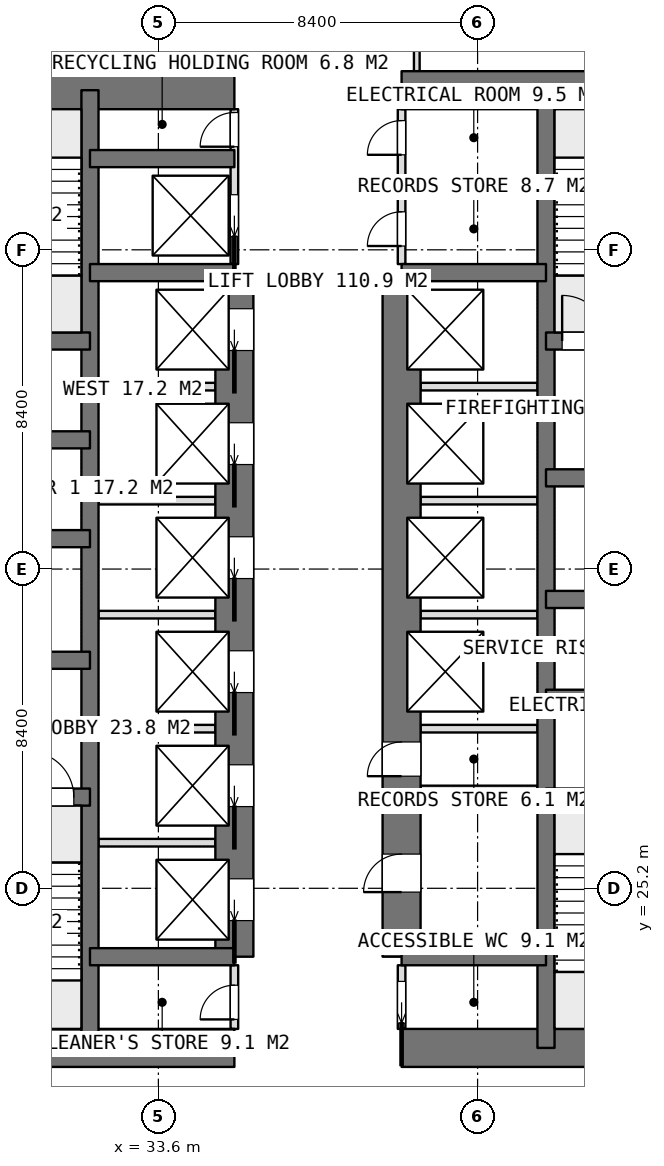
"""IFC4 building model, lengths in metres.
Left out: names, types, materials, properties, quantities, classifications, styles, units other than length and angle.
Written with IfcOpenShell. Run it as: python <this file> out.ifc"""

import sys

from ifc_helpers import new_model, si_unit, direction, frame, frame_2d, origin, place, context, subcontext, project, spatial, rectangle, extrude, element, fill, save


model = new_model("IFC4")
c1 = context("Model", 3, precision=1e-05, world=origin(), true_north=direction((0.0, 1.0)))
c2 = subcontext(c1, "Body", "Model", "MODEL_VIEW")
j1 = project(units=[si_unit("LENGTHUNIT", "METRE"), si_unit("PLANEANGLEUNIT", "RADIAN")], contexts=[c1])
p1 = place(None, origin())
s1 = spatial("IfcSite", under=j1, at=p1, CompositionType="ELEMENT")
p2 = place(p1, origin())
s2 = spatial("IfcBuilding", under=s1, at=p2, CompositionType="ELEMENT")
p3 = place(p2, frame((0.0, 0.0, 99.05)))
s3 = spatial("IfcBuildingStorey", under=s2, at=p3, CompositionType="ELEMENT", Elevation=99.05)
p4 = place(p3, frame((25.2, 21.0, 0.0), z_axis=(0.0, 0.0, 1.0), x_axis=(1.0, 0.0, 0.0)))
e1 = element("IfcWall", 1, at=p4, inside=s3, PredefinedType="SHEAR", context=c2, shape_type="SweptSolid", body=[
    extrude(rectangle(XDim=10.4, YDim=1.0, at=frame_2d((5.2, 0.0))), origin(), (0.0, 0.0, 1.0), 3.75),
])
p5 = place(p3, frame((40.0, 21.0, 0.0), z_axis=(0.0, 0.0, 1.0), x_axis=(1.0, 0.0, 0.0)))
e2 = element("IfcWall", 2, at=p5, inside=s3, PredefinedType="SHEAR", context=c2, shape_type="SweptSolid", body=[
    extrude(rectangle(XDim=10.4, YDim=1.0, at=frame_2d((5.2, 0.0))), origin(), (0.0, 0.0, 1.0), 3.75),
])
p6 = place(p3, frame((25.2, 46.2, 0.0), z_axis=(0.0, 0.0, 1.0), x_axis=(1.0, 0.0, 0.0)))
e3 = element("IfcWall", 3, at=p6, inside=s3, PredefinedType="SHEAR", context=c2, shape_type="SweptSolid", body=[
    extrude(rectangle(XDim=10.4, YDim=1.0, at=frame_2d((5.2, 0.0))), origin(), (0.0, 0.0, 1.0), 3.75),
])
p7 = place(p3, frame((40.0, 46.2, 0.0), z_axis=(0.0, 0.0, 1.0), x_axis=(1.0, 0.0, 0.0)))
e4 = element("IfcWall", 4, at=p7, inside=s3, PredefinedType="SHEAR", context=c2, shape_type="SweptSolid", body=[
    extrude(rectangle(XDim=10.4, YDim=1.0, at=frame_2d((5.2, 0.0))), origin(), (0.0, 0.0, 1.0), 3.75),
])
for number, where, z_axis, x_axis in (
    (5, (31.8, 21.0, 0.0), (0.0, 0.0, 1.0), (0.0, 1.0, 0.0)),
    (6, (43.8, 21.0, 0.0), (0.0, 0.0, 1.0), (0.0, 1.0, 0.0)),
):
    element("IfcWall", number, at=place(p3, frame(where, z_axis=z_axis, x_axis=x_axis)), inside=s3, PredefinedType="SHEAR", context=c2, shape_type="SweptSolid", body=[
        extrude(rectangle(XDim=25.2, YDim=0.45, at=frame_2d((12.6, 0.0))), origin(), (0.0, 0.0, 1.0), 3.75),
    ])
p8 = place(p3, frame((35.6, 23.4, 0.0), z_axis=(0.0, 0.0, 1.0), x_axis=(0.0, 1.0, 0.0)))
e7 = element("IfcWall", 7, at=p8, inside=s3, PredefinedType="SHEAR", context=c2, shape_type="SweptSolid", body=[
    extrude(rectangle(XDim=18.0, YDim=1.0, at=frame_2d((9.0, 0.0))), origin(), (0.0, 0.0, 1.0), 3.75),
])
p9 = place(p8, frame((0.95, 0.0, 0.0)))
e8 = element("IfcOpeningElement", 8, at=p9, cuts=e7, PredefinedType="OPENING", context=c2, shape_type="SweptSolid", body=[
    extrude(rectangle(XDim=1.1, YDim=2.1, at=frame_2d((0.55, 1.05))), frame((0.0, 0.51, 0.0), z_axis=(0.0, -1.0, 0.0), x_axis=(1.0, 0.0, 0.0)), (0.0, 0.0, 1.0), 1.02),
])
p10 = place(p8, frame((3.95, 0.0, 0.0)))
e9 = element("IfcOpeningElement", 9, at=p10, cuts=e7, PredefinedType="OPENING", context=c2, shape_type="SweptSolid", body=[
    extrude(rectangle(XDim=1.1, YDim=2.1, at=frame_2d((0.55, 1.05))), frame((0.0, 0.51, 0.0), z_axis=(0.0, -1.0, 0.0), x_axis=(1.0, 0.0, 0.0)), (0.0, 0.0, 1.0), 1.02),
])
p11 = place(p8, frame((6.95, 0.0, 0.0)))
e10 = element("IfcOpeningElement", 10, at=p11, cuts=e7, PredefinedType="OPENING", context=c2, shape_type="SweptSolid", body=[
    extrude(rectangle(XDim=1.1, YDim=2.1, at=frame_2d((0.55, 1.05))), frame((0.0, 0.51, 0.0), z_axis=(0.0, -1.0, 0.0), x_axis=(1.0, 0.0, 0.0)), (0.0, 0.0, 1.0), 1.02),
])
p12 = place(p8, frame((9.95, 0.0, 0.0)))
e11 = element("IfcOpeningElement", 11, at=p12, cuts=e7, PredefinedType="OPENING", context=c2, shape_type="SweptSolid", body=[
    extrude(rectangle(XDim=1.1, YDim=2.1, at=frame_2d((0.55, 1.05))), frame((0.0, 0.51, 0.0), z_axis=(0.0, -1.0, 0.0), x_axis=(1.0, 0.0, 0.0)), (0.0, 0.0, 1.0), 1.02),
])
p13 = place(p8, frame((12.95, 0.0, 0.0)))
e12 = element("IfcOpeningElement", 12, at=p13, cuts=e7, PredefinedType="OPENING", context=c2, shape_type="SweptSolid", body=[
    extrude(rectangle(XDim=1.1, YDim=2.1, at=frame_2d((0.55, 1.05))), frame((0.0, 0.51, 0.0), z_axis=(0.0, -1.0, 0.0), x_axis=(1.0, 0.0, 0.0)), (0.0, 0.0, 1.0), 1.02),
])
p14 = place(p8, frame((15.95, 0.0, 0.0)))
e13 = element("IfcOpeningElement", 13, at=p14, cuts=e7, PredefinedType="OPENING", context=c2, shape_type="SweptSolid", body=[
    extrude(rectangle(XDim=1.1, YDim=2.1, at=frame_2d((0.55, 1.05))), frame((0.0, 0.51, 0.0), z_axis=(0.0, -1.0, 0.0), x_axis=(1.0, 0.0, 0.0)), (0.0, 0.0, 1.0), 1.02),
])
p15 = place(p3, frame((40.0, 23.4, 0.0), z_axis=(0.0, 0.0, 1.0), x_axis=(0.0, 1.0, 0.0)))
e14 = element("IfcWall", 14, at=p15, inside=s3, PredefinedType="SHEAR", context=c2, shape_type="SweptSolid", body=[
    extrude(rectangle(XDim=18.0, YDim=1.0, at=frame_2d((9.0, 0.0))), origin(), (0.0, 0.0, 1.0), 3.75),
])
p16 = place(p15, frame((1.7, 0.0, 0.0)))
e15 = element("IfcOpeningElement", 15, at=p16, cuts=e14, PredefinedType="OPENING", context=c2, shape_type="SweptSolid", body=[
    extrude(rectangle(XDim=1.0, YDim=2.1, at=frame_2d((0.5, 1.05))), frame((0.0, 0.51, 0.0), z_axis=(0.0, -1.0, 0.0), x_axis=(1.0, 0.0, 0.0)), (0.0, 0.0, 1.0), 1.02),
])
p17 = place(p15, frame((4.75, 0.0, 0.0)))
e16 = element("IfcOpeningElement", 16, at=p17, cuts=e14, PredefinedType="OPENING", context=c2, shape_type="SweptSolid", body=[
    extrude(rectangle(XDim=0.9, YDim=2.1, at=frame_2d((0.45, 1.05))), frame((0.0, 0.51, 0.0), z_axis=(0.0, -1.0, 0.0), x_axis=(1.0, 0.0, 0.0)), (0.0, 0.0, 1.0), 1.02),
])
for number, where, z_axis, x_axis in (
    (17, (31.8, 23.4, 0.0), (0.0, 0.0, 1.0), (1.0, 0.0, 0.0)),
    (18, (31.8, 41.4, 0.0), (0.0, 0.0, 1.0), (1.0, 0.0, 0.0)),
    (19, (31.8, 44.4, 0.0), (0.0, 0.0, 1.0), (1.0, 0.0, 0.0)),
    (20, (40.0, 23.4, 0.0), (0.0, 0.0, 1.0), (1.0, 0.0, 0.0)),
    (21, (40.0, 41.4, 0.0), (0.0, 0.0, 1.0), (1.0, 0.0, 0.0)),
):
    element("IfcWall", number, at=place(p3, frame(where, z_axis=z_axis, x_axis=x_axis)), inside=s3, PredefinedType="SHEAR", context=c2, shape_type="SweptSolid", body=[
        extrude(rectangle(XDim=3.8, YDim=0.45, at=frame_2d((1.9, 0.0))), origin(), (0.0, 0.0, 1.0), 3.75),
    ])
p18 = place(p3, frame((25.2, 27.6, 0.0), z_axis=(0.0, 0.0, 1.0), x_axis=(1.0, 0.0, 0.0)))
e22 = element("IfcWall", 22, at=p18, inside=s3, PredefinedType="SHEAR", context=c2, shape_type="SweptSolid", body=[
    extrude(rectangle(XDim=6.6, YDim=0.45, at=frame_2d((3.3, 0.0))), origin(), (0.0, 0.0, 1.0), 3.75),
])
p19 = place(p18, frame((4.975, 0.0, 0.0)))
e23 = element("IfcOpeningElement", 23, at=p19, cuts=e22, PredefinedType="OPENING", context=c2, shape_type="SweptSolid", body=[
    extrude(rectangle(XDim=1.2, YDim=2.1, at=frame_2d((0.6, 1.05))), frame((0.0, 0.235, 0.0), z_axis=(0.0, -1.0, 0.0), x_axis=(1.0, 0.0, 0.0)), (0.0, 0.0, 1.0), 0.47),
])
p20 = place(p3, frame((25.2, 31.2, 0.0), z_axis=(0.0, 0.0, 1.0), x_axis=(1.0, 0.0, 0.0)))
e24 = element("IfcWall", 24, at=p20, inside=s3, PredefinedType="SHEAR", context=c2, shape_type="SweptSolid", body=[
    extrude(rectangle(XDim=6.6, YDim=0.45, at=frame_2d((3.3, 0.0))), origin(), (0.0, 0.0, 1.0), 3.75),
])
p21 = place(p20, frame((2.65, 0.0, 0.0)))
e25 = element("IfcOpeningElement", 25, at=p21, cuts=e24, PredefinedType="OPENING", context=c2, shape_type="SweptSolid", body=[
    extrude(rectangle(XDim=1.3, YDim=2.1, at=frame_2d((0.65, 1.05))), frame((0.0, 0.235, 0.0), z_axis=(0.0, -1.0, 0.0), x_axis=(1.0, 0.0, 0.0)), (0.0, 0.0, 1.0), 0.47),
])
for number, where, z_axis, x_axis in (
    (26, (25.2, 34.4, 0.0), (0.0, 0.0, 1.0), (1.0, 0.0, 0.0)),
    (27, (25.2, 37.0, 0.0), (0.0, 0.0, 1.0), (1.0, 0.0, 0.0)),
    (28, (25.2, 39.6, 0.0), (0.0, 0.0, 1.0), (1.0, 0.0, 0.0)),
):
    element("IfcWall", number, at=place(p3, frame(where, z_axis=z_axis, x_axis=x_axis)), inside=s3, PredefinedType="SHEAR", context=c2, shape_type="SweptSolid", body=[
        extrude(rectangle(XDim=6.6, YDim=0.45, at=frame_2d((3.3, 0.0))), origin(), (0.0, 0.0, 1.0), 3.75),
    ])
for number, where, z_axis, x_axis in (
    (29, (43.8, 27.6, 0.0), (0.0, 0.0, 1.0), (1.0, 0.0, 0.0)),
    (30, (43.8, 30.2, 0.0), (0.0, 0.0, 1.0), (1.0, 0.0, 0.0)),
    (31, (43.8, 32.8, 0.0), (0.0, 0.0, 1.0), (1.0, 0.0, 0.0)),
):
    element("IfcWall", number, at=place(p3, frame(where, z_axis=z_axis, x_axis=x_axis)), inside=s3, PredefinedType="SHEAR", context=c2, shape_type="SweptSolid", body=[
        extrude(rectangle(XDim=6.6, YDim=0.45, at=frame_2d((3.3, 0.0))), origin(), (0.0, 0.0, 1.0), 3.75),
    ])
p22 = place(p3, frame((43.8, 36.0, 0.0), z_axis=(0.0, 0.0, 1.0), x_axis=(1.0, 0.0, 0.0)))
e32 = element("IfcWall", 32, at=p22, inside=s3, PredefinedType="SHEAR", context=c2, shape_type="SweptSolid", body=[
    extrude(rectangle(XDim=6.6, YDim=0.45, at=frame_2d((3.3, 0.0))), origin(), (0.0, 0.0, 1.0), 3.75),
])
p23 = place(p22, frame((2.65, 0.0, 0.0)))
e33 = element("IfcOpeningElement", 33, at=p23, cuts=e32, PredefinedType="OPENING", context=c2, shape_type="SweptSolid", body=[
    extrude(rectangle(XDim=1.3, YDim=2.1, at=frame_2d((0.65, 1.05))), frame((0.0, 0.235, 0.0), z_axis=(0.0, -1.0, 0.0), x_axis=(1.0, 0.0, 0.0)), (0.0, 0.0, 1.0), 0.47),
])
p24 = place(p3, frame((43.8, 39.6, 0.0), z_axis=(0.0, 0.0, 1.0), x_axis=(1.0, 0.0, 0.0)))
e34 = element("IfcWall", 34, at=p24, inside=s3, PredefinedType="SHEAR", context=c2, shape_type="SweptSolid", body=[
    extrude(rectangle(XDim=6.6, YDim=0.45, at=frame_2d((3.3, 0.0))), origin(), (0.0, 0.0, 1.0), 3.75),
])
p25 = place(p24, frame((0.425, 0.0, 0.0)))
e35 = element("IfcOpeningElement", 35, at=p25, cuts=e34, PredefinedType="OPENING", context=c2, shape_type="SweptSolid", body=[
    extrude(rectangle(XDim=1.2, YDim=2.1, at=frame_2d((0.6, 1.05))), frame((0.0, 0.235, 0.0), z_axis=(0.0, -1.0, 0.0), x_axis=(1.0, 0.0, 0.0)), (0.0, 0.0, 1.0), 0.47),
])
for number, where, z_axis, x_axis in (
    (36, (32.025, 26.4, 0.0), (0.0, 0.0, 1.0), (1.0, 0.0, 0.0)),
    (37, (32.025, 29.4, 0.0), (0.0, 0.0, 1.0), (1.0, 0.0, 0.0)),
    (38, (32.025, 32.4, 0.0), (0.0, 0.0, 1.0), (1.0, 0.0, 0.0)),
    (39, (32.025, 35.4, 0.0), (0.0, 0.0, 1.0), (1.0, 0.0, 0.0)),
    (40, (32.025, 38.4, 0.0), (0.0, 0.0, 1.0), (1.0, 0.0, 0.0)),
):
    element("IfcWall", number, at=place(p3, frame(where, z_axis=z_axis, x_axis=x_axis)), inside=s3, PredefinedType="PARTITIONING", context=c2, shape_type="SweptSolid", body=[
        extrude(rectangle(XDim=3.075, YDim=0.2, at=frame_2d((1.538, 0.0))), origin(), (0.0, 0.0, 1.0), 3.5),
    ])
for number, where, z_axis, x_axis in (
    (41, (40.5, 29.4, 0.0), (0.0, 0.0, 1.0), (1.0, 0.0, 0.0)),
    (42, (40.5, 32.4, 0.0), (0.0, 0.0, 1.0), (1.0, 0.0, 0.0)),
    (43, (40.5, 35.4, 0.0), (0.0, 0.0, 1.0), (1.0, 0.0, 0.0)),
    (44, (40.5, 38.4, 0.0), (0.0, 0.0, 1.0), (1.0, 0.0, 0.0)),
):
    element("IfcWall", number, at=place(p3, frame(where, z_axis=z_axis, x_axis=x_axis)), inside=s3, PredefinedType="PARTITIONING", context=c2, shape_type="SweptSolid", body=[
        extrude(rectangle(XDim=3.075, YDim=0.2, at=frame_2d((1.538, 0.0))), origin(), (0.0, 0.0, 1.0), 3.5),
    ])
p26 = place(p3, frame((40.0, 21.5, 0.0), z_axis=(0.0, 0.0, 1.0), x_axis=(0.0, 1.0, 0.0)))
e45 = element("IfcWall", 45, at=p26, inside=s3, PredefinedType="PARTITIONING", context=c2, shape_type="SweptSolid", body=[
    extrude(rectangle(XDim=1.675, YDim=0.2, at=frame_2d((0.837, 0.0))), origin(), (0.0, 0.0, 1.0), 3.5),
])
p27 = place(p26, frame((0.15, 0.0, 0.0)))
e46 = element("IfcOpeningElement", 46, at=p27, cuts=e45, PredefinedType="OPENING", context=c2, shape_type="SweptSolid", body=[
    extrude(rectangle(XDim=1.1, YDim=2.1, at=frame_2d((0.55, 1.05))), frame((0.0, 0.11, 0.0), z_axis=(0.0, -1.0, 0.0), x_axis=(1.0, 0.0, 0.0)), (0.0, 0.0, 1.0), 0.22),
])
p28 = place(p3, frame((40.0, 41.625, 0.0), z_axis=(0.0, 0.0, 1.0), x_axis=(0.0, 1.0, 0.0)))
e47 = element("IfcWall", 47, at=p28, inside=s3, PredefinedType="PARTITIONING", context=c2, shape_type="SweptSolid", body=[
    extrude(rectangle(XDim=4.075, YDim=0.2, at=frame_2d((2.038, 0.0))), origin(), (0.0, 0.0, 1.0), 3.5),
])
p29 = place(p28, frame((2.875, 0.0, 0.0)))
e48 = element("IfcOpeningElement", 48, at=p29, cuts=e47, PredefinedType="OPENING", context=c2, shape_type="SweptSolid", body=[
    extrude(rectangle(XDim=0.9, YDim=2.1, at=frame_2d((0.45, 1.05))), frame((0.0, 0.11, 0.0), z_axis=(0.0, -1.0, 0.0), x_axis=(1.0, 0.0, 0.0)), (0.0, 0.0, 1.0), 0.22),
])
p30 = place(p28, frame((0.475, 0.0, 0.0)))
e49 = element("IfcOpeningElement", 49, at=p30, cuts=e47, PredefinedType="OPENING", context=c2, shape_type="SweptSolid", body=[
    extrude(rectangle(XDim=0.9, YDim=2.1, at=frame_2d((0.45, 1.05))), frame((0.0, 0.11, 0.0), z_axis=(0.0, -1.0, 0.0), x_axis=(1.0, 0.0, 0.0)), (0.0, 0.0, 1.0), 0.22),
])
p31 = place(p3, frame((35.6, 41.625, 0.0), z_axis=(0.0, 0.0, 1.0), x_axis=(0.0, 1.0, 0.0)))
e50 = element("IfcWall", 50, at=p31, inside=s3, PredefinedType="PARTITIONING", context=c2, shape_type="SweptSolid", body=[
    extrude(rectangle(XDim=4.075, YDim=0.2, at=frame_2d((2.038, 0.0))), origin(), (0.0, 0.0, 1.0), 3.5),
])
p32 = place(p31, frame((3.088, 0.0, 0.0)))
e51 = element("IfcOpeningElement", 51, at=p32, cuts=e50, PredefinedType="OPENING", context=c2, shape_type="SweptSolid", body=[
    extrude(rectangle(XDim=0.9, YDim=2.1, at=frame_2d((0.45, 1.05))), frame((0.0, 0.11, 0.0), z_axis=(0.0, -1.0, 0.0), x_axis=(1.0, 0.0, 0.0)), (0.0, 0.0, 1.0), 0.22),
])
p33 = place(p31, frame((0.725, 0.0, 0.0)))
e52 = element("IfcOpeningElement", 52, at=p33, cuts=e50, PredefinedType="OPENING", context=c2, shape_type="SweptSolid", body=[
    extrude(rectangle(XDim=1.1, YDim=2.1, at=frame_2d((0.55, 1.05))), frame((0.0, 0.11, 0.0), z_axis=(0.0, -1.0, 0.0), x_axis=(1.0, 0.0, 0.0)), (0.0, 0.0, 1.0), 0.22),
])
p34 = place(p3, frame((35.6, 21.5, 0.0), z_axis=(0.0, 0.0, 1.0), x_axis=(0.0, 1.0, 0.0)))
e53 = element("IfcWall", 53, at=p34, inside=s3, PredefinedType="PARTITIONING", context=c2, shape_type="SweptSolid", body=[
    extrude(rectangle(XDim=1.675, YDim=0.2, at=frame_2d((0.837, 0.0))), origin(), (0.0, 0.0, 1.0), 3.5),
])
p35 = place(p34, frame((0.25, 0.0, 0.0)))
e54 = element("IfcOpeningElement", 54, at=p35, cuts=e53, PredefinedType="OPENING", context=c2, shape_type="SweptSolid", body=[
    extrude(rectangle(XDim=0.9, YDim=2.1, at=frame_2d((0.45, 1.05))), frame((0.0, 0.11, 0.0), z_axis=(0.0, -1.0, 0.0), x_axis=(1.0, 0.0, 0.0)), (0.0, 0.0, 1.0), 0.22),
])
p36 = place(p3, frame((40.5, 27.8, 0.0), z_axis=(0.0, 0.0, 1.0), x_axis=(1.0, 0.0, 0.0)))
e55 = element("IfcWall", 55, at=p36, inside=s3, PredefinedType="PARTITIONING", context=c2, shape_type="SweptSolid", body=[
    extrude(rectangle(XDim=3.075, YDim=0.2, at=frame_2d((1.538, 0.0))), origin(), (0.0, 0.0, 1.0), 3.5),
])
p37 = place(p3, frame((40.0, 43.7, 0.0), z_axis=(0.0, 0.0, 1.0), x_axis=(1.0, 0.0, 0.0)))
e56 = element("IfcWall", 56, at=p37, inside=s3, PredefinedType="PARTITIONING", context=c2, shape_type="SweptSolid", body=[
    extrude(rectangle(XDim=3.575, YDim=0.2, at=frame_2d((1.788, 0.0))), origin(), (0.0, 0.0, 1.0), 3.5),
])
for number, where, z_axis, x_axis in (
    (57, (40.4, 46.7, 0.0), (0.0, 0.0, 1.0), (0.0, 1.0, 0.0)),
    (58, (35.2, 46.7, 0.0), (0.0, 0.0, 1.0), (0.0, 1.0, 0.0)),
):
    element("IfcWall", number, at=place(p3, frame(where, z_axis=z_axis, x_axis=x_axis)), inside=s3, PredefinedType="PARTITIONING", context=c2, shape_type="SweptSolid", body=[
        extrude(rectangle(XDim=2.625, YDim=0.15, at=frame_2d((1.312, 0.0))), origin(), (0.0, 0.0, 1.0), 3.5),
    ])
p38 = place(p27, origin())
e59 = element("IfcDoor", 59, at=p38, inside=s3, OperationType="SLIDING_TO_LEFT", PredefinedType="DOOR", context=c2, shape_type="SweptSolid", body=[
    extrude(rectangle(XDim=1.1, YDim=2.1, at=frame_2d((0.55, 1.05))), frame((0.0, 0.025, 0.0), z_axis=(0.0, -1.0, 0.0), x_axis=(1.0, 0.0, 0.0)), (0.0, 0.0, 1.0), 0.05),
])
fill(e46, e59)
p39 = place(p35, origin())
e60 = element("IfcDoor", 60, at=p39, inside=s3, OperationType="SINGLE_SWING_LEFT", PredefinedType="DOOR", context=c2, shape_type="SweptSolid", body=[
    extrude(rectangle(XDim=0.9, YDim=2.1, at=frame_2d((0.45, 1.05))), frame((0.0, 0.025, 0.0), z_axis=(0.0, -1.0, 0.0), x_axis=(1.0, 0.0, 0.0)), (0.0, 0.0, 1.0), 0.05),
])
fill(e54, e60)
p40 = place(p29, origin())
e61 = element("IfcDoor", 61, at=p40, inside=s3, OperationType="SINGLE_SWING_LEFT", PredefinedType="DOOR", context=c2, shape_type="SweptSolid", body=[
    extrude(rectangle(XDim=0.9, YDim=2.1, at=frame_2d((0.45, 1.05))), frame((0.0, 0.025, 0.0), z_axis=(0.0, -1.0, 0.0), x_axis=(1.0, 0.0, 0.0)), (0.0, 0.0, 1.0), 0.05),
])
fill(e48, e61)
p41 = place(p30, origin())
e62 = element("IfcDoor", 62, at=p41, inside=s3, OperationType="SINGLE_SWING_LEFT", PredefinedType="DOOR", context=c2, shape_type="SweptSolid", body=[
    extrude(rectangle(XDim=0.9, YDim=2.1, at=frame_2d((0.45, 1.05))), frame((0.0, 0.025, 0.0), z_axis=(0.0, -1.0, 0.0), x_axis=(1.0, 0.0, 0.0)), (0.0, 0.0, 1.0), 0.05),
])
fill(e49, e62)
p42 = place(p16, origin())
e63 = element("IfcDoor", 63, at=p42, inside=s3, OperationType="SINGLE_SWING_LEFT", PredefinedType="DOOR", context=c2, shape_type="SweptSolid", body=[
    extrude(rectangle(XDim=1.0, YDim=2.1, at=frame_2d((0.5, 1.05))), frame((0.0, 0.025, 0.0), z_axis=(0.0, -1.0, 0.0), x_axis=(1.0, 0.0, 0.0)), (0.0, 0.0, 1.0), 0.05),
])
fill(e15, e63)
p43 = place(p17, origin())
e64 = element("IfcDoor", 64, at=p43, inside=s3, OperationType="SINGLE_SWING_LEFT", PredefinedType="DOOR", context=c2, shape_type="SweptSolid", body=[
    extrude(rectangle(XDim=0.9, YDim=2.1, at=frame_2d((0.45, 1.05))), frame((0.0, 0.025, 0.0), z_axis=(0.0, -1.0, 0.0), x_axis=(1.0, 0.0, 0.0)), (0.0, 0.0, 1.0), 0.05),
])
fill(e16, e64)
p44 = place(p32, origin())
e65 = element("IfcDoor", 65, at=p44, inside=s3, OperationType="SINGLE_SWING_LEFT", PredefinedType="DOOR", context=c2, shape_type="SweptSolid", body=[
    extrude(rectangle(XDim=0.9, YDim=2.1, at=frame_2d((0.45, 1.05))), frame((0.0, 0.025, 0.0), z_axis=(0.0, -1.0, 0.0), x_axis=(1.0, 0.0, 0.0)), (0.0, 0.0, 1.0), 0.05),
])
fill(e51, e65)
p45 = place(p9, origin())
e66 = element("IfcDoor", 66, at=p45, inside=s3, OperationType="SLIDING_TO_LEFT", PredefinedType="USERDEFINED", context=c2, shape_type="SweptSolid", body=[
    extrude(rectangle(XDim=1.1, YDim=2.1, at=frame_2d((0.55, 1.05))), frame((0.0, 0.025, 0.0), z_axis=(0.0, -1.0, 0.0), x_axis=(1.0, 0.0, 0.0)), (0.0, 0.0, 1.0), 0.05),
])
fill(e8, e66)
p46 = place(p10, origin())
e67 = element("IfcDoor", 67, at=p46, inside=s3, OperationType="SLIDING_TO_LEFT", PredefinedType="USERDEFINED", context=c2, shape_type="SweptSolid", body=[
    extrude(rectangle(XDim=1.1, YDim=2.1, at=frame_2d((0.55, 1.05))), frame((0.0, 0.025, 0.0), z_axis=(0.0, -1.0, 0.0), x_axis=(1.0, 0.0, 0.0)), (0.0, 0.0, 1.0), 0.05),
])
fill(e9, e67)
p47 = place(p11, origin())
e68 = element("IfcDoor", 68, at=p47, inside=s3, OperationType="SLIDING_TO_LEFT", PredefinedType="USERDEFINED", context=c2, shape_type="SweptSolid", body=[
    extrude(rectangle(XDim=1.1, YDim=2.1, at=frame_2d((0.55, 1.05))), frame((0.0, 0.025, 0.0), z_axis=(0.0, -1.0, 0.0), x_axis=(1.0, 0.0, 0.0)), (0.0, 0.0, 1.0), 0.05),
])
fill(e10, e68)
p48 = place(p12, origin())
e69 = element("IfcDoor", 69, at=p48, inside=s3, OperationType="SLIDING_TO_LEFT", PredefinedType="USERDEFINED", context=c2, shape_type="SweptSolid", body=[
    extrude(rectangle(XDim=1.1, YDim=2.1, at=frame_2d((0.55, 1.05))), frame((0.0, 0.025, 0.0), z_axis=(0.0, -1.0, 0.0), x_axis=(1.0, 0.0, 0.0)), (0.0, 0.0, 1.0), 0.05),
])
fill(e11, e69)
p49 = place(p13, origin())
e70 = element("IfcDoor", 70, at=p49, inside=s3, OperationType="SLIDING_TO_LEFT", PredefinedType="USERDEFINED", context=c2, shape_type="SweptSolid", body=[
    extrude(rectangle(XDim=1.1, YDim=2.1, at=frame_2d((0.55, 1.05))), frame((0.0, 0.025, 0.0), z_axis=(0.0, -1.0, 0.0), x_axis=(1.0, 0.0, 0.0)), (0.0, 0.0, 1.0), 0.05),
])
fill(e12, e70)
p50 = place(p14, origin())
e71 = element("IfcDoor", 71, at=p50, inside=s3, OperationType="SLIDING_TO_LEFT", PredefinedType="USERDEFINED", context=c2, shape_type="SweptSolid", body=[
    extrude(rectangle(XDim=1.1, YDim=2.1, at=frame_2d((0.55, 1.05))), frame((0.0, 0.025, 0.0), z_axis=(0.0, -1.0, 0.0), x_axis=(1.0, 0.0, 0.0)), (0.0, 0.0, 1.0), 0.05),
])
fill(e13, e71)
p51 = place(p33, origin())
e72 = element("IfcDoor", 72, at=p51, inside=s3, OperationType="SLIDING_TO_LEFT", PredefinedType="USERDEFINED", context=c2, shape_type="SweptSolid", body=[
    extrude(rectangle(XDim=1.1, YDim=2.1, at=frame_2d((0.55, 1.05))), frame((0.0, 0.025, 0.0), z_axis=(0.0, -1.0, 0.0), x_axis=(1.0, 0.0, 0.0)), (0.0, 0.0, 1.0), 0.05),
])
fill(e52, e72)
p52 = place(p19, origin())
e73 = element("IfcDoor", 73, at=p52, inside=s3, OperationType="SINGLE_SWING_RIGHT", PredefinedType="DOOR", context=c2, shape_type="SweptSolid", body=[
    extrude(rectangle(XDim=1.2, YDim=2.1, at=frame_2d((0.6, 1.05))), frame((0.0, 0.025, 0.0), z_axis=(0.0, -1.0, 0.0), x_axis=(1.0, 0.0, 0.0)), (0.0, 0.0, 1.0), 0.05),
])
fill(e23, e73)
p53 = place(p25, origin())
e74 = element("IfcDoor", 74, at=p53, inside=s3, OperationType="SINGLE_SWING_RIGHT", PredefinedType="DOOR", context=c2, shape_type="SweptSolid", body=[
    extrude(rectangle(XDim=1.2, YDim=2.1, at=frame_2d((0.6, 1.05))), frame((0.0, 0.025, 0.0), z_axis=(0.0, -1.0, 0.0), x_axis=(1.0, 0.0, 0.0)), (0.0, 0.0, 1.0), 0.05),
])
fill(e35, e74)
save(model, sys.argv[1])
